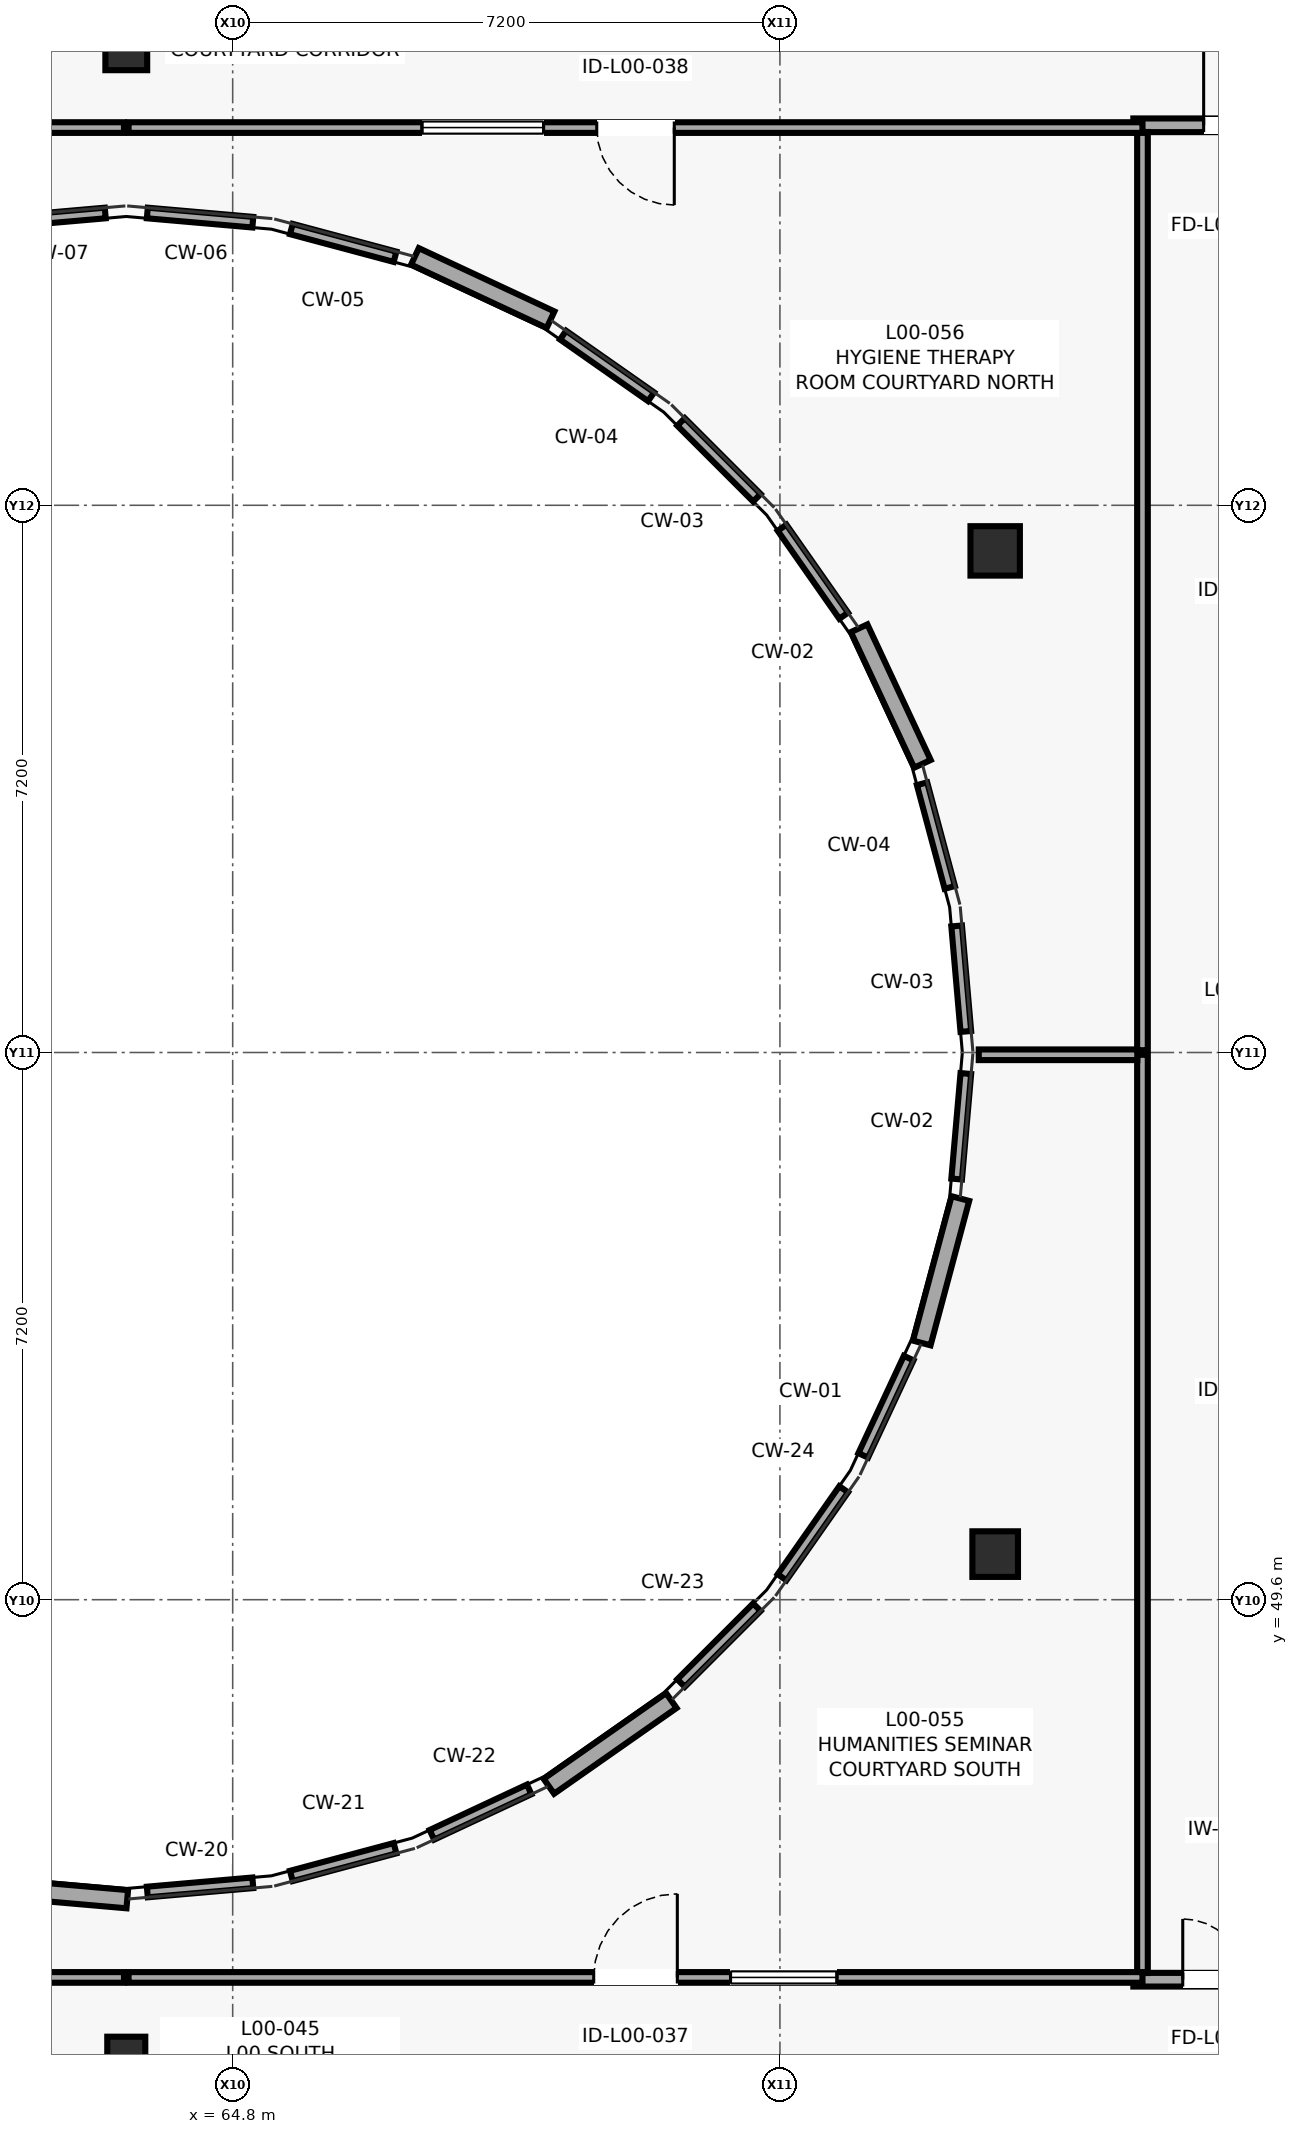
"""IFC4 building model, lengths in metres.
Left out: names, types, materials, properties, quantities, classifications, styles, units other than length and angle.
Written with IfcOpenShell. Run it as: python <this file> out.ifc"""

import sys

from ifc_helpers import new_model, si_unit, direction, frame, frame_2d, origin, origin_2d, place, context, subcontext, project, spatial, rectangle, circle, extrude, element, fill, save


model = new_model("IFC4")
c1 = context("Model", 3, precision=1e-05, world=origin(), true_north=direction((0.0, 1.0)))
c2 = subcontext(c1, "Body", "Model", "MODEL_VIEW")
j1 = project(units=[si_unit("LENGTHUNIT", "METRE"), si_unit("PLANEANGLEUNIT", "RADIAN")], contexts=[c1])
p1 = place(None, origin())
s1 = spatial("IfcSite", under=j1, at=p1, CompositionType="ELEMENT")
p2 = place(p1, origin())
s2 = spatial("IfcBuilding", under=s1, at=p2, CompositionType="ELEMENT")
p3 = place(p2, origin())
s3 = spatial("IfcBuildingStorey", under=s2, at=p3, CompositionType="ELEMENT", Elevation=0.0)
p4 = place(p3, frame((63.4, 43.6, 0.0), z_axis=(0.0, 0.0, 1.0), x_axis=(1.0, 0.0, 0.0)))
e1 = element("IfcColumn", 1, at=p4, inside=s3, PredefinedType="COLUMN", context=c2, shape_type="SweptSolid", body=[
    extrude(circle(Radius=0.25, at=origin_2d()), origin(), (0.0, 0.0, 1.0), 4.2),
])
p5 = place(p3, frame((63.4, 70.0, 0.0), z_axis=(0.0, 0.0, 1.0), x_axis=(1.0, 0.0, 0.0)))
e2 = element("IfcColumn", 2, at=p5, inside=s3, PredefinedType="COLUMN", context=c2, shape_type="SweptSolid", body=[
    extrude(circle(Radius=0.275, at=origin_2d()), origin(), (0.0, 0.0, 1.0), 4.2),
])
p6 = place(p3, frame((74.832, 50.2, 0.0), z_axis=(0.0, 0.0, 1.0), x_axis=(1.0, 0.0, 0.0)))
e3 = element("IfcColumn", 3, at=p6, inside=s3, PredefinedType="COLUMN", context=c2, shape_type="SweptSolid", body=[
    extrude(circle(Radius=0.3, at=origin_2d()), origin(), (0.0, 0.0, 1.0), 4.2),
])
p7 = place(p3, frame((74.832, 63.4, 0.0), z_axis=(0.0, 0.0, 1.0), x_axis=(1.0, 0.0, 0.0)))
e4 = element("IfcColumn", 4, at=p7, inside=s3, PredefinedType="COLUMN", context=c2, shape_type="SweptSolid", body=[
    extrude(circle(Radius=0.325, at=origin_2d()), origin(), (0.0, 0.0, 1.0), 4.2),
])
p8 = place(p3, frame((68.982, 66.442, 0.0), z_axis=(0.0, 0.0, 1.0), x_axis=(-0.906084909348, 0.423095895811, 0.0)))
e5 = element("IfcWall", 5, at=p8, inside=s3, PredefinedType="SOLIDWALL", context=c2, shape_type="SweptSolid", body=[
    extrude(rectangle(XDim=1.969, YDim=0.24, at=frame_2d((0.984, 0.0))), origin(), (0.0, 0.0, 1.0), 3.98),
])
p9 = place(p3, frame((61.453, 45.83, 0.0), z_axis=(0.0, 0.0, 1.0), x_axis=(0.996210264846, -0.086977630546, 0.0)))
e6 = element("IfcWall", 6, at=p9, inside=s3, PredefinedType="SOLIDWALL", context=c2, shape_type="SweptSolid", body=[
    extrude(rectangle(XDim=1.968, YDim=0.24, at=frame_2d((0.984, 0.0))), origin(), (0.0, 0.0, 1.0), 3.98),
])
p10 = place(p3, frame((68.96, 47.145, 0.0), z_axis=(0.0, 0.0, 1.0), x_axis=(0.819191094316, 0.573520663092, 0.0)))
e7 = element("IfcWall", 7, at=p10, inside=s3, PredefinedType="SOLIDWALL", context=c2, shape_type="SweptSolid", body=[
    extrude(rectangle(XDim=1.967, YDim=0.24, at=frame_2d((0.983, 0.0))), origin(), (0.0, 0.0, 1.0), 3.98),
])
p11 = place(p3, frame((73.866, 52.978, 0.0), z_axis=(0.0, 0.0, 1.0), x_axis=(0.258334797167, 0.966055450051, 0.0)))
e8 = element("IfcWall", 8, at=p11, inside=s3, PredefinedType="SOLIDWALL", context=c2, shape_type="SweptSolid", body=[
    extrude(rectangle(XDim=1.967, YDim=0.24, at=frame_2d((0.983, 0.0))), origin(), (0.0, 0.0, 1.0), 3.98),
])
p12 = place(p3, frame((73.875, 60.598, 0.0), z_axis=(0.0, 0.0, 1.0), x_axis=(-0.423048362943, 0.906107103278, 0.0)))
e9 = element("IfcWall", 9, at=p12, inside=s3, PredefinedType="SOLIDWALL", context=c2, shape_type="SweptSolid", body=[
    extrude(rectangle(XDim=1.969, YDim=0.24, at=frame_2d((0.984, 0.0))), origin(), (0.0, 0.0, 1.0), 3.98),
])
p13 = place(p3, frame((76.65, 44.6, 0.0), z_axis=(0.0, 0.0, 1.0), x_axis=(1.0, 0.0, 0.0)))
e10 = element("IfcWall", 10, at=p13, inside=s3, PredefinedType="PARTITIONING", context=c2, shape_type="SweptSolid", body=[
    extrude(rectangle(XDim=2.9, YDim=0.18, at=frame_2d((1.45, 0.0))), origin(), (0.0, 0.0, 1.0), 3.98),
])
p14 = place(p13, frame((0.65, 0.0, 0.0)))
e11 = element("IfcOpeningElement", 11, at=p14, cuts=e10, PredefinedType="OPENING", context=c2, shape_type="SweptSolid", body=[
    extrude(rectangle(XDim=1.6, YDim=2.25, at=frame_2d((0.8, 1.125))), frame((0.0, 0.1, 0.0), z_axis=(0.0, -1.0, 0.0), x_axis=(1.0, 0.0, 0.0)), (0.0, 0.0, 1.0), 0.2),
])
p15 = place(p3, frame((76.65, 69.0, 0.0), z_axis=(0.0, 0.0, 1.0), x_axis=(1.0, 0.0, 0.0)))
e12 = element("IfcWall", 12, at=p15, inside=s3, PredefinedType="PARTITIONING", context=c2, shape_type="SweptSolid", body=[
    extrude(rectangle(XDim=2.9, YDim=0.18, at=frame_2d((1.45, 0.0))), origin(), (0.0, 0.0, 1.0), 3.98),
])
p16 = place(p15, frame((0.925, 0.0, 0.0)))
e13 = element("IfcOpeningElement", 13, at=p16, cuts=e12, PredefinedType="OPENING", context=c2, shape_type="SweptSolid", body=[
    extrude(rectangle(XDim=1.05, YDim=2.15, at=frame_2d((0.525, 1.075))), frame((0.0, 0.1, 0.0), z_axis=(0.0, -1.0, 0.0), x_axis=(1.0, 0.0, 0.0)), (0.0, 0.0, 1.0), 0.2),
])
p17 = place(p3, frame((51.498, 44.63, 0.0), z_axis=(0.0, 0.0, 1.0), x_axis=(1.0, 0.0, 0.0)))
e14 = element("IfcWall", 14, at=p17, inside=s3, PredefinedType="PARTITIONING", context=c2, shape_type="SweptSolid", body=[
    extrude(rectangle(XDim=11.872, YDim=0.14, at=frame_2d((5.936, 0.0))), origin(), (0.0, 0.0, 1.0), 3.975),
])
p18 = place(p17, frame((5.436, 0.0, 0.0)))
e15 = element("IfcOpeningElement", 15, at=p18, cuts=e14, PredefinedType="OPENING", context=c2, shape_type="SweptSolid", body=[
    extrude(rectangle(XDim=1.0, YDim=2.1, at=frame_2d((0.5, 1.05))), frame((0.0, 0.08, 0.0), z_axis=(0.0, -1.0, 0.0), x_axis=(1.0, 0.0, 0.0)), (0.0, 0.0, 1.0), 0.16),
])
p19 = place(p17, frame((7.136, 0.0, 1.05)))
e16 = element("IfcOpeningElement", 16, at=p19, cuts=e14, PredefinedType="OPENING", context=c2, shape_type="SweptSolid", body=[
    extrude(rectangle(XDim=1.6, YDim=1.1, at=frame_2d((0.8, 0.55))), frame((0.0, 0.08, 0.0), z_axis=(0.0, -1.0, 0.0), x_axis=(1.0, 0.0, 0.0)), (0.0, 0.0, 1.0), 0.16),
])
p20 = place(p3, frame((61.735, 67.725, 0.0), z_axis=(0.0, 0.0, 1.0), x_axis=(0.99623071841, 0.086743044083, 0.0)))
e17 = element("IfcWall", 17, at=p20, inside=s3, PredefinedType="PARTITIONING", context=c2, shape_type="SweptSolid", body=[
    extrude(rectangle(XDim=1.393, YDim=0.14, at=frame_2d((0.697, 0.0))), origin(), (0.0, 0.0, 1.0), 3.975),
])
p21 = place(p3, frame((63.37, 68.97, 0.0), z_axis=(0.0, 0.0, 1.0), x_axis=(-1.0, 0.0, 0.0)))
e18 = element("IfcWall", 18, at=p21, inside=s3, PredefinedType="PARTITIONING", context=c2, shape_type="SweptSolid", body=[
    extrude(rectangle(XDim=17.54, YDim=0.14, at=frame_2d((8.77, 0.0))), origin(), (0.0, 0.0, 1.0), 3.975),
])
p22 = place(p21, frame((7.945, 0.0, 0.0)))
e19 = element("IfcOpeningElement", 19, at=p22, cuts=e18, PredefinedType="OPENING", context=c2, shape_type="SweptSolid", body=[
    extrude(rectangle(XDim=1.65, YDim=2.32, at=frame_2d((0.825, 1.16))), frame((0.0, 0.08, 0.0), z_axis=(0.0, -1.0, 0.0), x_axis=(1.0, 0.0, 0.0)), (0.0, 0.0, 1.0), 0.16),
])
p23 = place(p21, frame((10.295, 0.0, 1.05)))
e20 = element("IfcOpeningElement", 20, at=p23, cuts=e18, PredefinedType="OPENING", context=c2, shape_type="SweptSolid", body=[
    extrude(rectangle(XDim=1.8, YDim=1.2, at=frame_2d((0.9, 0.6))), frame((0.0, 0.08, 0.0), z_axis=(0.0, -1.0, 0.0), x_axis=(1.0, 0.0, 0.0)), (0.0, 0.0, 1.0), 0.16),
])
p24 = place(p3, frame((76.77, 44.688, 0.0), z_axis=(0.0, 0.0, 1.0), x_axis=(0.0, 1.0, 0.0)))
e21 = element("IfcWall", 21, at=p24, inside=s3, PredefinedType="PARTITIONING", context=c2, shape_type="SweptSolid", body=[
    extrude(rectangle(XDim=12.082, YDim=0.14, at=frame_2d((6.041, 0.0))), origin(), (0.0, 0.0, 1.0), 3.975),
])
p25 = place(p3, frame((76.702, 56.77, 0.0), z_axis=(0.0, 0.0, 1.0), x_axis=(-1.0, 0.0, 0.0)))
e22 = element("IfcWall", 22, at=p25, inside=s3, PredefinedType="PARTITIONING", context=c2, shape_type="SweptSolid", body=[
    extrude(rectangle(XDim=2.086, YDim=0.14, at=frame_2d((1.043, 0.0))), origin(), (0.0, 0.0, 1.0), 3.975),
])
p26 = place(p3, frame((74.446, 56.523, 0.0), z_axis=(0.0, 0.0, 1.0), x_axis=(-0.086916960031, -0.996215560037, 0.0)))
e23 = element("IfcWall", 23, at=p26, inside=s3, PredefinedType="PARTITIONING", context=c2, shape_type="SweptSolid", body=[
    extrude(rectangle(XDim=1.393, YDim=0.14, at=frame_2d((0.697, 0.0))), origin(), (0.0, 0.0, 1.0), 3.975),
])
p27 = place(p3, frame((73.694, 52.779, 0.0), z_axis=(0.0, 0.0, 1.0), x_axis=(-0.423348930736, -0.905966711775, 0.0)))
e24 = element("IfcWall", 24, at=p27, inside=s3, PredefinedType="PARTITIONING", context=c2, shape_type="SweptSolid", body=[
    extrude(rectangle(XDim=1.413, YDim=0.14, at=frame_2d((0.707, 0.0))), origin(), (0.0, 0.0, 1.0), 3.975),
])
p28 = place(p3, frame((72.839, 51.053, 0.0), z_axis=(0.0, 0.0, 1.0), x_axis=(-0.57368253481, -0.819077743108, 0.0)))
e25 = element("IfcWall", 25, at=p28, inside=s3, PredefinedType="PARTITIONING", context=c2, shape_type="SweptSolid", body=[
    extrude(rectangle(XDim=1.414, YDim=0.14, at=frame_2d((0.707, 0.0))), origin(), (0.0, 0.0, 1.0), 3.975),
])
p29 = place(p3, frame((71.697, 49.501, 0.0), z_axis=(0.0, 0.0, 1.0), x_axis=(-0.707106781187, -0.707106781187, 0.0)))
e26 = element("IfcWall", 26, at=p29, inside=s3, PredefinedType="PARTITIONING", context=c2, shape_type="SweptSolid", body=[
    extrude(rectangle(XDim=1.411, YDim=0.14, at=frame_2d((0.706, 0.0))), origin(), (0.0, 0.0, 1.0), 3.975),
])
p30 = place(p3, frame((68.701, 47.104, 0.0), z_axis=(0.0, 0.0, 1.0), x_axis=(-0.906032979506, -0.423207088844, 0.0)))
e27 = element("IfcWall", 27, at=p30, inside=s3, PredefinedType="PARTITIONING", context=c2, shape_type="SweptSolid", body=[
    extrude(rectangle(XDim=1.413, YDim=0.14, at=frame_2d((0.707, 0.0))), origin(), (0.0, 0.0, 1.0), 3.975),
])
p31 = place(p3, frame((66.936, 46.33, 0.0), z_axis=(0.0, 0.0, 1.0), x_axis=(-0.966013611766, -0.258491202719, 0.0)))
e28 = element("IfcWall", 28, at=p31, inside=s3, PredefinedType="PARTITIONING", context=c2, shape_type="SweptSolid", body=[
    extrude(rectangle(XDim=1.412, YDim=0.14, at=frame_2d((0.706, 0.0))), origin(), (0.0, 0.0, 1.0), 3.975),
])
p32 = place(p3, frame((65.065, 45.875, 0.0), z_axis=(0.0, 0.0, 1.0), x_axis=(-0.996215560037, -0.086916960031, 0.0)))
e29 = element("IfcWall", 29, at=p32, inside=s3, PredefinedType="PARTITIONING", context=c2, shape_type="SweptSolid", body=[
    extrude(rectangle(XDim=1.393, YDim=0.14, at=frame_2d((0.697, 0.0))), origin(), (0.0, 0.0, 1.0), 3.975),
])
p33 = place(p3, frame((63.43, 44.63, 0.0), z_axis=(0.0, 0.0, 1.0), x_axis=(1.0, 0.0, 0.0)))
e30 = element("IfcWall", 30, at=p33, inside=s3, PredefinedType="PARTITIONING", context=c2, shape_type="SweptSolid", body=[
    extrude(rectangle(XDim=13.34, YDim=0.14, at=frame_2d((6.67, 0.0))), origin(), (0.0, 0.0, 1.0), 3.975),
])
p34 = place(p33, frame((6.12, 0.0, 0.0)))
e31 = element("IfcOpeningElement", 31, at=p34, cuts=e30, PredefinedType="OPENING", context=c2, shape_type="SweptSolid", body=[
    extrude(rectangle(XDim=1.1, YDim=2.1, at=frame_2d((0.55, 1.05))), frame((0.0, 0.08, 0.0), z_axis=(0.0, -1.0, 0.0), x_axis=(1.0, 0.0, 0.0)), (0.0, 0.0, 1.0), 0.16),
])
p35 = place(p33, frame((7.92, 0.0, 1.05)))
e32 = element("IfcOpeningElement", 32, at=p35, cuts=e30, PredefinedType="OPENING", context=c2, shape_type="SweptSolid", body=[
    extrude(rectangle(XDim=1.4, YDim=1.05, at=frame_2d((0.7, 0.525))), frame((0.0, 0.08, 0.0), z_axis=(0.0, -1.0, 0.0), x_axis=(1.0, 0.0, 0.0)), (0.0, 0.0, 1.0), 0.16),
])
p36 = place(p3, frame((76.77, 56.83, 0.0), z_axis=(0.0, 0.0, 1.0), x_axis=(0.0, 1.0, 0.0)))
e33 = element("IfcWall", 33, at=p36, inside=s3, PredefinedType="PARTITIONING", context=c2, shape_type="SweptSolid", body=[
    extrude(rectangle(XDim=12.082, YDim=0.14, at=frame_2d((6.041, 0.0))), origin(), (0.0, 0.0, 1.0), 3.975),
])
p37 = place(p3, frame((76.77, 68.97, 0.0), z_axis=(0.0, 0.0, 1.0), x_axis=(-1.0, 0.0, 0.0)))
e34 = element("IfcWall", 34, at=p37, inside=s3, PredefinedType="PARTITIONING", context=c2, shape_type="SweptSolid", body=[
    extrude(rectangle(XDim=13.34, YDim=0.14, at=frame_2d((6.67, 0.0))), origin(), (0.0, 0.0, 1.0), 3.975),
])
p38 = place(p37, frame((6.16, 0.0, 0.0)))
e35 = element("IfcOpeningElement", 35, at=p38, cuts=e34, PredefinedType="OPENING", context=c2, shape_type="SweptSolid", body=[
    extrude(rectangle(XDim=1.02, YDim=2.14, at=frame_2d((0.51, 1.07))), frame((0.0, 0.08, 0.0), z_axis=(0.0, -1.0, 0.0), x_axis=(1.0, 0.0, 0.0)), (0.0, 0.0, 1.0), 0.16),
])
p39 = place(p37, frame((7.88, 0.0, 1.05)))
e36 = element("IfcOpeningElement", 36, at=p39, cuts=e34, PredefinedType="OPENING", context=c2, shape_type="SweptSolid", body=[
    extrude(rectangle(XDim=1.6, YDim=1.1, at=frame_2d((0.8, 0.55))), frame((0.0, 0.08, 0.0), z_axis=(0.0, -1.0, 0.0), x_axis=(1.0, 0.0, 0.0)), (0.0, 0.0, 1.0), 0.16),
])
p40 = place(p3, frame((63.677, 67.846, 0.0), z_axis=(0.0, 0.0, 1.0), x_axis=(0.99623071841, -0.086743044083, 0.0)))
e37 = element("IfcWall", 37, at=p40, inside=s3, PredefinedType="PARTITIONING", context=c2, shape_type="SweptSolid", body=[
    extrude(rectangle(XDim=1.393, YDim=0.14, at=frame_2d((0.697, 0.0))), origin(), (0.0, 0.0, 1.0), 3.975),
])
p41 = place(p3, frame((65.572, 67.635, 0.0), z_axis=(0.0, 0.0, 1.0), x_axis=(0.966013611766, -0.258491202719, 0.0)))
e38 = element("IfcWall", 38, at=p41, inside=s3, PredefinedType="PARTITIONING", context=c2, shape_type="SweptSolid", body=[
    extrude(rectangle(XDim=1.412, YDim=0.14, at=frame_2d((0.706, 0.0))), origin(), (0.0, 0.0, 1.0), 3.975),
])
p42 = place(p3, frame((69.147, 66.239, 0.0), z_axis=(0.0, 0.0, 1.0), x_axis=(0.819077743108, -0.57368253481, 0.0)))
e39 = element("IfcWall", 39, at=p42, inside=s3, PredefinedType="PARTITIONING", context=c2, shape_type="SweptSolid", body=[
    extrude(rectangle(XDim=1.414, YDim=0.14, at=frame_2d((0.707, 0.0))), origin(), (0.0, 0.0, 1.0), 3.975),
])
p43 = place(p3, frame((70.699, 65.097, 0.0), z_axis=(0.0, 0.0, 1.0), x_axis=(0.707193272138, -0.707020279655, 0.0)))
e40 = element("IfcWall", 40, at=p43, inside=s3, PredefinedType="PARTITIONING", context=c2, shape_type="SweptSolid", body=[
    extrude(rectangle(XDim=1.411, YDim=0.14, at=frame_2d((0.706, 0.0))), origin(), (0.0, 0.0, 1.0), 3.975),
])
p44 = place(p3, frame((72.028, 63.705, 0.0), z_axis=(0.0, 0.0, 1.0), x_axis=(0.57368253481, -0.819077743108, 0.0)))
e41 = element("IfcWall", 41, at=p44, inside=s3, PredefinedType="PARTITIONING", context=c2, shape_type="SweptSolid", body=[
    extrude(rectangle(XDim=1.414, YDim=0.14, at=frame_2d((0.707, 0.0))), origin(), (0.0, 0.0, 1.0), 3.975),
])
p45 = place(p3, frame((73.87, 60.336, 0.0), z_axis=(0.0, 0.0, 1.0), x_axis=(0.258491202719, -0.966013611766, 0.0)))
e42 = element("IfcWall", 42, at=p45, inside=s3, PredefinedType="PARTITIONING", context=c2, shape_type="SweptSolid", body=[
    extrude(rectangle(XDim=1.412, YDim=0.14, at=frame_2d((0.706, 0.0))), origin(), (0.0, 0.0, 1.0), 3.975),
])
p46 = place(p3, frame((74.325, 58.465, 0.0), z_axis=(0.0, 0.0, 1.0), x_axis=(0.086901789347, -0.996216883519, 0.0)))
e43 = element("IfcWall", 43, at=p46, inside=s3, PredefinedType="PARTITIONING", context=c2, shape_type="SweptSolid", body=[
    extrude(rectangle(XDim=1.394, YDim=0.14, at=frame_2d((0.697, 0.0))), origin(), (0.0, 0.0, 1.0), 3.975),
])
p47 = place(p14, origin())
e44 = element("IfcDoor", 44, at=p47, inside=s3, OperationType="DOUBLE_DOOR_SINGLE_SWING", PredefinedType="DOOR", context=c2, shape_type="SweptSolid", body=[
    extrude(rectangle(XDim=1.6, YDim=2.25, at=frame_2d((0.8, 1.125))), frame((0.0, 0.025, 0.0), z_axis=(0.0, -1.0, 0.0), x_axis=(1.0, 0.0, 0.0)), (0.0, 0.0, 1.0), 0.05),
])
fill(e11, e44)
p48 = place(p16, origin())
e45 = element("IfcDoor", 45, at=p48, inside=s3, OperationType="SINGLE_SWING_LEFT", PredefinedType="DOOR", context=c2, shape_type="SweptSolid", body=[
    extrude(rectangle(XDim=1.05, YDim=2.15, at=frame_2d((0.525, 1.075))), frame((0.0, 0.025, 0.0), z_axis=(0.0, -1.0, 0.0), x_axis=(1.0, 0.0, 0.0)), (0.0, 0.0, 1.0), 0.05),
])
fill(e13, e45)
p49 = place(p34, origin())
e46 = element("IfcDoor", 46, at=p49, inside=s3, OperationType="SINGLE_SWING_RIGHT", PredefinedType="DOOR", context=c2, shape_type="SweptSolid", body=[
    extrude(rectangle(XDim=1.1, YDim=2.1, at=frame_2d((0.55, 1.05))), frame((0.0, 0.025, 0.0), z_axis=(0.0, -1.0, 0.0), x_axis=(1.0, 0.0, 0.0)), (0.0, 0.0, 1.0), 0.05),
])
fill(e31, e46)
p50 = place(p35, origin())
e47 = element("IfcWindow", 47, at=p50, inside=s3, PartitioningType="SINGLE_PANEL", PredefinedType="WINDOW", context=c2, shape_type="SweptSolid", body=[
    extrude(rectangle(XDim=1.4, YDim=1.05, at=frame_2d((0.7, 0.525))), frame((0.0, 0.03, 0.0), z_axis=(0.0, -1.0, 0.0), x_axis=(1.0, 0.0, 0.0)), (0.0, 0.0, 1.0), 0.06),
])
fill(e32, e47)
p51 = place(p38, origin())
e48 = element("IfcDoor", 48, at=p51, inside=s3, OperationType="SINGLE_SWING_LEFT", PredefinedType="DOOR", context=c2, shape_type="SweptSolid", body=[
    extrude(rectangle(XDim=1.02, YDim=2.14, at=frame_2d((0.51, 1.07))), frame((0.0, 0.025, 0.0), z_axis=(0.0, -1.0, 0.0), x_axis=(1.0, 0.0, 0.0)), (0.0, 0.0, 1.0), 0.05),
])
fill(e35, e48)
p52 = place(p39, origin())
e49 = element("IfcWindow", 49, at=p52, inside=s3, PartitioningType="SINGLE_PANEL", PredefinedType="WINDOW", context=c2, shape_type="SweptSolid", body=[
    extrude(rectangle(XDim=1.6, YDim=1.1, at=frame_2d((0.8, 0.55))), frame((0.0, 0.03, 0.0), z_axis=(0.0, -1.0, 0.0), x_axis=(1.0, 0.0, 0.0)), (0.0, 0.0, 1.0), 0.06),
])
fill(e36, e49)
save(model, sys.argv[1])
